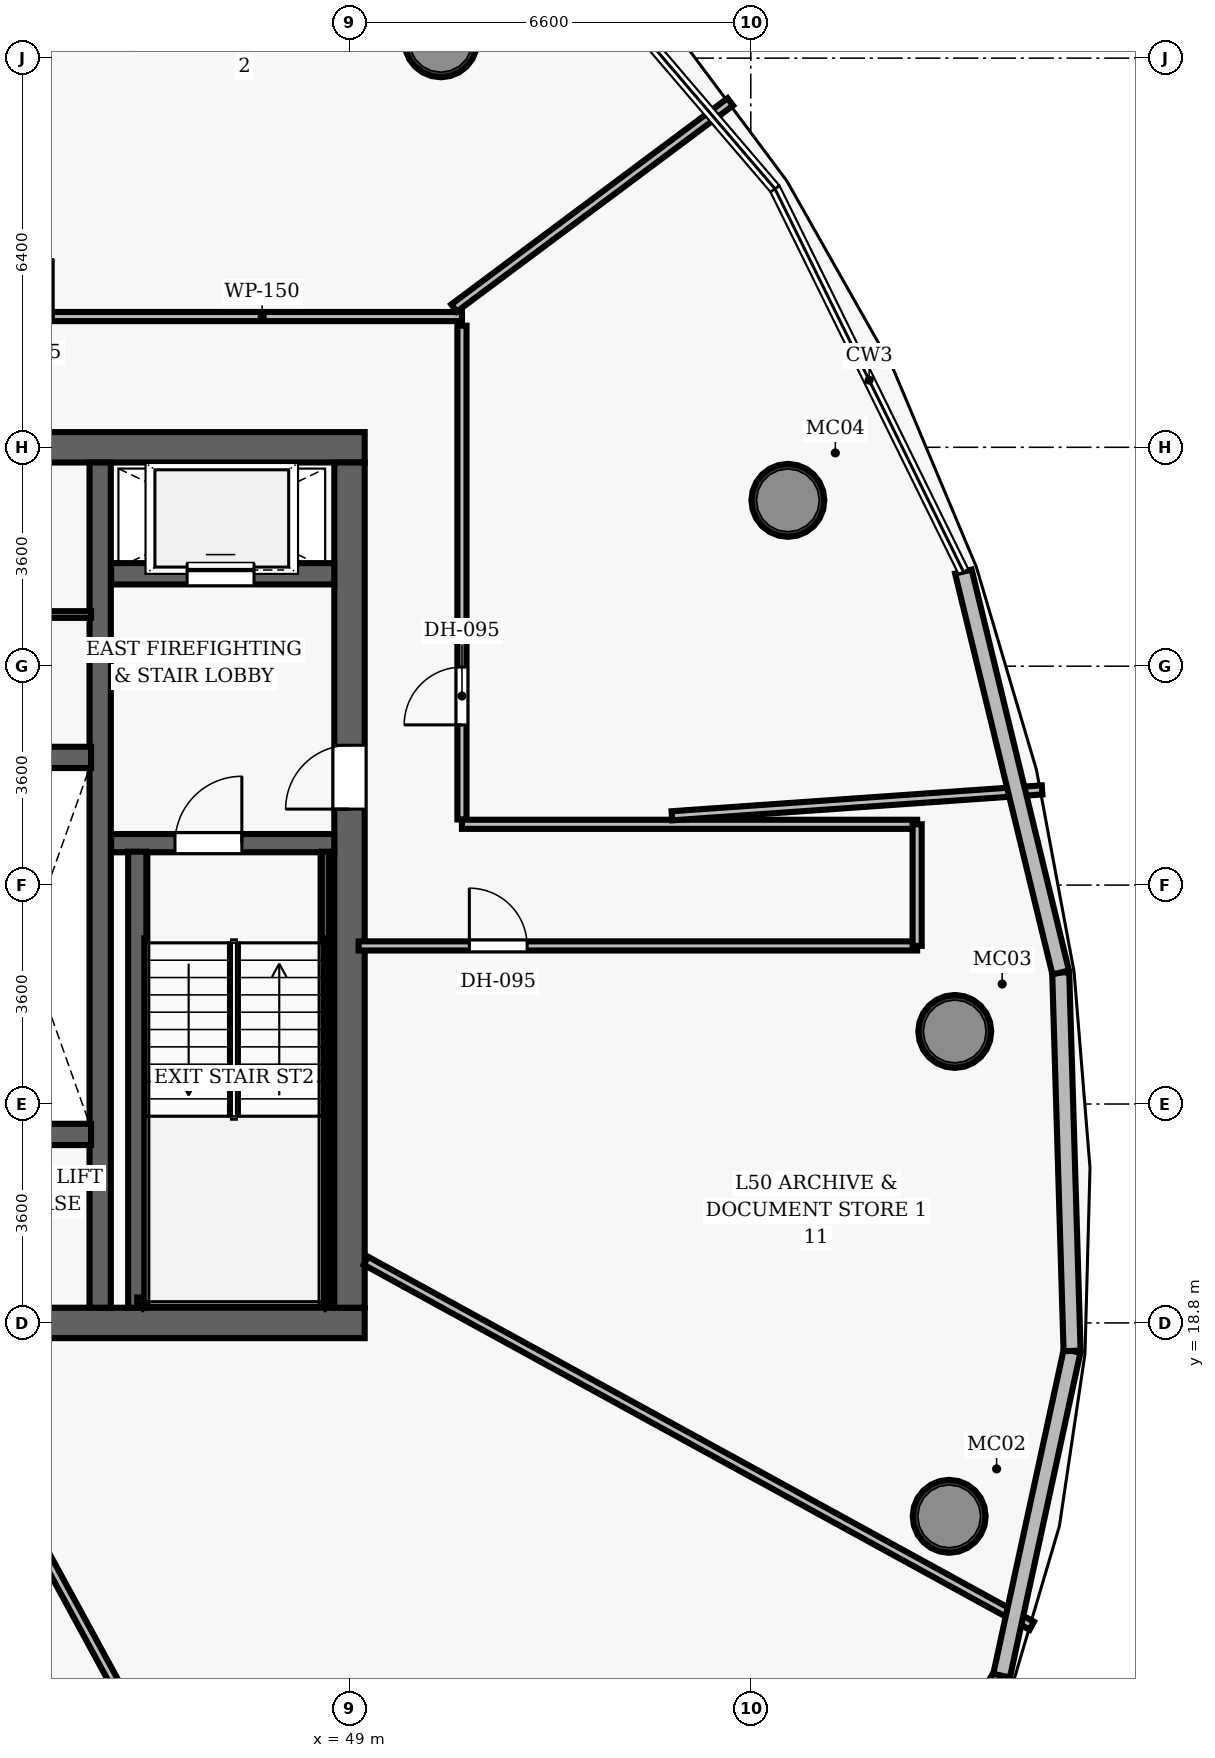
"""IFC4 building model, lengths in metres.
Left out: names, types, materials, properties, quantities, classifications, styles, units other than length and angle.
Written with IfcOpenShell. Run it as: python <this file> out.ifc"""

import sys

from ifc_helpers import new_model, si_unit, direction, frame, frame_2d, origin, origin_2d, place, context, subcontext, project, spatial, rectangle, hollow_circle, extrude, element, fill, save


model = new_model("IFC4")
c1 = context("Model", 3, precision=1e-05, world=origin(), true_north=direction((0.0, 1.0)))
c2 = subcontext(c1, "Body", "Model", "MODEL_VIEW")
j1 = project(units=[si_unit("LENGTHUNIT", "METRE"), si_unit("PLANEANGLEUNIT", "RADIAN")], contexts=[c1])
p1 = place(None, origin())
s1 = spatial("IfcSite", under=j1, at=p1, CompositionType="ELEMENT")
p2 = place(p1, origin())
s2 = spatial("IfcBuilding", under=s1, at=p2, CompositionType="ELEMENT")
p3 = place(p2, frame((0.0, 0.0, 198.15)))
s3 = spatial("IfcBuildingStorey", under=s2, at=p3, CompositionType="ELEMENT", Elevation=198.15)
p4 = place(p3, frame((26.75, 18.8, 0.0), z_axis=(0.0, 0.0, 1.0), x_axis=(1.0, 0.0, 0.0)))
e1 = element("IfcWall", 1, at=p4, inside=s3, PredefinedType="SHEAR", context=c2, shape_type="SweptSolid", body=[
    extrude(rectangle(XDim=22.5, YDim=0.5, at=frame_2d((11.25, 0.0))), origin(), (0.0, 0.0, 1.0), 3.85),
])
p5 = place(p4, frame((14.47, 0.0, 0.0)))
e2 = element("IfcOpeningElement", 2, at=p5, cuts=e1, PredefinedType="OPENING", context=c2, shape_type="SweptSolid", body=[
    extrude(rectangle(XDim=1.05, YDim=2.15, at=frame_2d((0.525, 1.075))), frame((0.0, 0.26, 0.0), z_axis=(0.0, -1.0, 0.0), x_axis=(1.0, 0.0, 0.0)), (0.0, 0.0, 1.0), 0.52),
])
p6 = place(p3, frame((26.75, 33.2, 0.0), z_axis=(0.0, 0.0, 1.0), x_axis=(1.0, 0.0, 0.0)))
e3 = element("IfcWall", 3, at=p6, inside=s3, PredefinedType="SHEAR", context=c2, shape_type="SweptSolid", body=[
    extrude(rectangle(XDim=22.5, YDim=0.5, at=frame_2d((11.25, 0.0))), origin(), (0.0, 0.0, 1.0), 3.85),
])
p7 = place(p6, frame((4.57, 0.0, 0.0)))
e4 = element("IfcOpeningElement", 4, at=p7, cuts=e3, PredefinedType="OPENING", context=c2, shape_type="SweptSolid", body=[
    extrude(rectangle(XDim=1.05, YDim=2.15, at=frame_2d((0.525, 1.075))), frame((0.0, 0.26, 0.0), z_axis=(0.0, -1.0, 0.0), x_axis=(1.0, 0.0, 0.0)), (0.0, 0.0, 1.0), 0.52),
])
p8 = place(p6, frame((14.47, 0.0, 0.0)))
e5 = element("IfcOpeningElement", 5, at=p8, cuts=e3, PredefinedType="OPENING", context=c2, shape_type="SweptSolid", body=[
    extrude(rectangle(XDim=1.05, YDim=2.15, at=frame_2d((0.525, 1.075))), frame((0.0, 0.26, 0.0), z_axis=(0.0, -1.0, 0.0), x_axis=(1.0, 0.0, 0.0)), (0.0, 0.0, 1.0), 0.52),
])
p9 = place(p3, frame((49.0, 19.05, 0.0), z_axis=(0.0, 0.0, 1.0), x_axis=(0.0, 1.0, 0.0)))
e6 = element("IfcWall", 6, at=p9, inside=s3, PredefinedType="SHEAR", context=c2, shape_type="SweptSolid", body=[
    extrude(rectangle(XDim=13.9, YDim=0.5, at=frame_2d((6.95, 0.0))), origin(), (0.0, 0.0, 1.0), 3.85),
])
p10 = place(p9, frame((8.2, 0.0, 0.0)))
e7 = element("IfcOpeningElement", 7, at=p10, cuts=e6, PredefinedType="OPENING", context=c2, shape_type="SweptSolid", body=[
    extrude(rectangle(XDim=1.05, YDim=2.15, at=frame_2d((0.525, 1.075))), frame((0.0, 0.26, 0.0), z_axis=(0.0, -1.0, 0.0), x_axis=(1.0, 0.0, 0.0)), (0.0, 0.0, 1.0), 0.52),
])
p11 = place(p3, frame((44.9, 19.05, 0.0), z_axis=(0.0, 0.0, 1.0), x_axis=(0.0, 1.0, 0.0)))
e8 = element("IfcWall", 8, at=p11, inside=s3, PredefinedType="SHEAR", context=c2, shape_type="SweptSolid", body=[
    extrude(rectangle(XDim=13.9, YDim=0.35, at=frame_2d((6.95, 0.0))), origin(), (0.0, 0.0, 1.0), 3.85),
])
for number, where, z_axis, x_axis in (
    (9, (58.863, 15.619, 0.0), (0.0, 0.0, 1.0), (1.0, 0.0, 0.0)),
    (10, (58.955, 23.594, 0.0), (0.0, 0.0, 1.0), (1.0, 0.0, 0.0)),
    (11, (56.21, 32.327, 0.0), (0.0, 0.0, 1.0), (1.0, 0.0, 0.0)),
    (12, (50.502, 39.885, 0.0), (0.0, 0.0, 1.0), (1.0, 0.0, 0.0)),
):
    element("IfcColumn", number, at=place(p3, frame(where, z_axis=z_axis, x_axis=x_axis)), inside=s3, PredefinedType="COLUMN", context=c2, shape_type="SweptSolid", body=[
        extrude(hollow_circle(Radius=0.6, WallThickness=0.05, at=origin_2d()), origin(), (0.0, 0.0, 1.0), 3.85),
    ])
p12 = place(p3, frame((45.08, 26.69, 0.0), z_axis=(0.0, 0.0, 1.0), x_axis=(1.0, 0.0, 0.0)))
e13 = element("IfcWall", 13, at=p12, inside=s3, PredefinedType="SHEAR", context=c2, shape_type="SweptSolid", body=[
    extrude(rectangle(XDim=3.67, YDim=0.3, at=frame_2d((1.835, 0.0))), origin(), (0.0, 0.0, 1.0), 3.85),
])
p13 = place(p12, frame((1.05, 0.0, 0.0)))
e14 = element("IfcOpeningElement", 14, at=p13, cuts=e13, PredefinedType="OPENING", context=c2, shape_type="SweptSolid", body=[
    extrude(rectangle(XDim=1.1, YDim=2.15, at=frame_2d((0.55, 1.075))), frame((0.0, 0.16, 0.0), z_axis=(0.0, -1.0, 0.0), x_axis=(1.0, 0.0, 0.0)), (0.0, 0.0, 1.0), 0.32),
])
p14 = place(p3, frame((45.51, 19.05, 0.0), z_axis=(0.0, 0.0, 1.0), x_axis=(0.0, 1.0, 0.0)))
e15 = element("IfcWall", 15, at=p14, inside=s3, PredefinedType="SHEAR", context=c2, shape_type="SweptSolid", body=[
    extrude(rectangle(XDim=7.5, YDim=0.3, at=frame_2d((3.75, 0.0))), origin(), (0.0, 0.0, 1.0), 3.85),
])
p15 = place(p3, frame((48.605, 19.1, 0.0), z_axis=(0.0, 0.0, 1.0), x_axis=(0.0, 1.0, 0.0)))
e16 = element("IfcWall", 16, at=p15, inside=s3, PredefinedType="SHEAR", context=c2, shape_type="SweptSolid", body=[
    extrude(rectangle(XDim=7.45, YDim=0.12, at=frame_2d((3.725, 0.0))), origin(), (0.0, 0.0, 1.0), 3.85),
])
p16 = place(p3, frame((45.51, 19.16, 0.0), z_axis=(0.0, 0.0, 1.0), x_axis=(1.0, 0.0, 0.0)))
e17 = element("IfcWall", 17, at=p16, inside=s3, PredefinedType="SHEAR", context=c2, shape_type="SweptSolid", body=[
    extrude(rectangle(XDim=3.095, YDim=0.12, at=frame_2d((1.547, 0.0))), origin(), (0.0, 0.0, 1.0), 3.85),
])
p17 = place(p3, frame((45.08, 31.12, 0.0), z_axis=(0.0, 0.0, 1.0), x_axis=(1.0, 0.0, 0.0)))
e18 = element("IfcWall", 18, at=p17, inside=s3, PredefinedType="SHEAR", context=c2, shape_type="SweptSolid", body=[
    extrude(rectangle(XDim=3.67, YDim=0.35, at=frame_2d((1.835, 0.0))), origin(), (0.0, 0.0, 1.0), 3.035),
])
p18 = place(p17, frame((1.25, 0.0, 0.0)))
e19 = element("IfcOpeningElement", 19, at=p18, cuts=e18, PredefinedType="OPENING", context=c2, shape_type="SweptSolid", body=[
    extrude(rectangle(XDim=1.1, YDim=2.15, at=frame_2d((0.55, 1.075))), frame((0.0, 0.185, 0.0), z_axis=(0.0, -1.0, 0.0), x_axis=(1.0, 0.0, 0.0)), (0.0, 0.0, 1.0), 0.37),
])
for number, where, z_axis, x_axis in (
    (20, (42.72, 21.9, 0.0), (0.0, 0.0, 1.0), (1.0, 0.0, 0.0)),
    (21, (42.72, 28.1, 0.0), (0.0, 0.0, 1.0), (1.0, 0.0, 0.0)),
):
    element("IfcWall", number, at=place(p3, frame(where, z_axis=z_axis, x_axis=x_axis)), inside=s3, PredefinedType="SHEAR", context=c2, shape_type="SweptSolid", body=[
        extrude(rectangle(XDim=2.03, YDim=0.35, at=frame_2d((1.015, 0.0))), origin(), (0.0, 0.0, 1.0), 3.035),
    ])
p19 = place(p3, frame((42.55, 30.45, 0.0), z_axis=(0.0, 0.0, 1.0), x_axis=(1.0, 0.0, 0.0)))
e22 = element("IfcWall", 22, at=p19, inside=s3, PredefinedType="PARTITIONING", context=c2, shape_type="SweptSolid", body=[
    extrude(rectangle(XDim=2.2, YDim=0.11, at=frame_2d((1.1, 0.0))), origin(), (0.0, 0.0, 1.0), 3.035),
])
p20 = place(p3, frame((24.85, 35.35, 0.0), z_axis=(0.0, 0.0, 1.0), x_axis=(1.0, 0.0, 0.0)))
e23 = element("IfcWall", 23, at=p20, inside=s3, PredefinedType="PARTITIONING", context=c2, shape_type="SweptSolid", body=[
    extrude(rectangle(XDim=26.0, YDim=0.15, at=frame_2d((13.0, 0.0))), origin(), (0.0, 0.0, 1.0), 3.035),
])
p21 = place(p20, frame((18.327, 0.0, 0.0)))
e24 = element("IfcOpeningElement", 24, at=p21, cuts=e23, PredefinedType="OPENING", context=c2, shape_type="SweptSolid", body=[
    extrude(rectangle(XDim=0.95, YDim=2.15, at=frame_2d((0.475, 1.075))), frame((0.0, 0.085, 0.0), z_axis=(0.0, -1.0, 0.0), x_axis=(1.0, 0.0, 0.0)), (0.0, 0.0, 1.0), 0.17),
])
p22 = place(p20, frame((11.881, 0.0, 0.0)))
e25 = element("IfcOpeningElement", 25, at=p22, cuts=e23, PredefinedType="OPENING", context=c2, shape_type="SweptSolid", body=[
    extrude(rectangle(XDim=0.95, YDim=2.15, at=frame_2d((0.475, 1.075))), frame((0.0, 0.085, 0.0), z_axis=(0.0, -1.0, 0.0), x_axis=(1.0, 0.0, 0.0)), (0.0, 0.0, 1.0), 0.17),
])
p23 = place(p20, frame((5.711, 0.0, 0.0)))
e26 = element("IfcOpeningElement", 26, at=p23, cuts=e23, PredefinedType="OPENING", context=c2, shape_type="SweptSolid", body=[
    extrude(rectangle(XDim=0.95, YDim=2.15, at=frame_2d((0.475, 1.075))), frame((0.0, 0.085, 0.0), z_axis=(0.0, -1.0, 0.0), x_axis=(1.0, 0.0, 0.0)), (0.0, 0.0, 1.0), 0.17),
])
p24 = place(p20, frame((1.528, 0.0, 0.0)))
e27 = element("IfcOpeningElement", 27, at=p24, cuts=e23, PredefinedType="OPENING", context=c2, shape_type="SweptSolid", body=[
    extrude(rectangle(XDim=0.95, YDim=2.15, at=frame_2d((0.475, 1.075))), frame((0.0, 0.085, 0.0), z_axis=(0.0, -1.0, 0.0), x_axis=(1.0, 0.0, 0.0)), (0.0, 0.0, 1.0), 0.17),
])
p25 = place(p3, frame((50.85, 27.08, 0.0), z_axis=(0.0, 0.0, 1.0), x_axis=(0.0, 1.0, 0.0)))
e28 = element("IfcWall", 28, at=p25, inside=s3, PredefinedType="PARTITIONING", context=c2, shape_type="SweptSolid", body=[
    extrude(rectangle(XDim=8.12, YDim=0.15, at=frame_2d((4.06, 0.0))), origin(), (0.0, 0.0, 1.0), 3.035),
])
p26 = place(p25, frame((1.555, 0.0, 0.0)))
e29 = element("IfcOpeningElement", 29, at=p26, cuts=e28, PredefinedType="OPENING", context=c2, shape_type="SweptSolid", body=[
    extrude(rectangle(XDim=0.95, YDim=2.15, at=frame_2d((0.475, 1.075))), frame((0.0, 0.085, 0.0), z_axis=(0.0, -1.0, 0.0), x_axis=(1.0, 0.0, 0.0)), (0.0, 0.0, 1.0), 0.17),
])
p27 = place(p3, frame((50.85, 27.0, 0.0), z_axis=(0.0, 0.0, 1.0), x_axis=(1.0, 0.0, 0.0)))
e30 = element("IfcWall", 30, at=p27, inside=s3, PredefinedType="PARTITIONING", context=c2, shape_type="SweptSolid", body=[
    extrude(rectangle(XDim=7.486, YDim=0.15, at=frame_2d((3.743, 0.0))), origin(), (0.0, 0.0, 1.0), 3.035),
])
p28 = place(p3, frame((49.15, 25.0, 0.0), z_axis=(0.0, 0.0, 1.0), x_axis=(1.0, 0.0, 0.0)))
e31 = element("IfcWall", 31, at=p28, inside=s3, PredefinedType="PARTITIONING", context=c2, shape_type="SweptSolid", body=[
    extrude(rectangle(XDim=9.186, YDim=0.15, at=frame_2d((4.593, 0.0))), origin(), (0.0, 0.0, 1.0), 3.035),
])
p29 = place(p28, frame((1.822, 0.0, 0.0)))
e32 = element("IfcOpeningElement", 32, at=p29, cuts=e31, PredefinedType="OPENING", context=c2, shape_type="SweptSolid", body=[
    extrude(rectangle(XDim=0.95, YDim=2.15, at=frame_2d((0.475, 1.075))), frame((0.0, 0.085, 0.0), z_axis=(0.0, -1.0, 0.0), x_axis=(1.0, 0.0, 0.0)), (0.0, 0.0, 1.0), 0.17),
])
p30 = place(p3, frame((58.336, 25.0, 0.0), z_axis=(0.0, 0.0, 1.0), x_axis=(0.0, 1.0, 0.0)))
e33 = element("IfcWall", 33, at=p30, inside=s3, PredefinedType="PARTITIONING", context=c2, shape_type="SweptSolid", body=[
    extrude(rectangle(XDim=2.0, YDim=0.15, at=frame_2d((1.0, 0.0))), origin(), (0.0, 0.0, 1.0), 3.035),
])
p31 = place(p3, frame((54.303, 27.14, 0.0), z_axis=(0.0, 0.0, 1.0), x_axis=(0.997563201077, 0.069768616566, 0.0)))
e34 = element("IfcWall", 34, at=p31, inside=s3, PredefinedType="PARTITIONING", context=c2, shape_type="SweptSolid", body=[
    extrude(rectangle(XDim=6.103, YDim=0.15, at=frame_2d((3.051, 0.0))), origin(), (0.0, 0.0, 1.0), 3.035),
])
p32 = place(p3, frame((50.719, 35.49, 0.0), z_axis=(0.0, 0.0, 1.0), x_axis=(0.801485791148, 0.598013818057, 0.0)))
e35 = element("IfcWall", 35, at=p32, inside=s3, PredefinedType="PARTITIONING", context=c2, shape_type="SweptSolid", body=[
    extrude(rectangle(XDim=5.669, YDim=0.15, at=frame_2d((2.835, 0.0))), origin(), (0.0, 0.0, 1.0), 3.035),
])
p33 = place(p3, frame((41.557, 35.49, 0.0), z_axis=(0.0, 0.0, 1.0), x_axis=(0.350952470756, 0.936393273828, 0.0)))
e36 = element("IfcWall", 36, at=p33, inside=s3, PredefinedType="PARTITIONING", context=c2, shape_type="SweptSolid", body=[
    extrude(rectangle(XDim=12.207, YDim=0.15, at=frame_2d((6.103, 0.0))), origin(), (0.0, 0.0, 1.0), 3.035),
])
p34 = place(p3, frame((42.74, 17.287, 0.0), z_axis=(0.0, 0.0, 1.0), x_axis=(0.477858429319, -0.878436862574, 0.0)))
e37 = element("IfcWall", 37, at=p34, inside=s3, PredefinedType="PARTITIONING", context=c2, shape_type="SweptSolid", body=[
    extrude(rectangle(XDim=14.791, YDim=0.15, at=frame_2d((7.396, 0.0))), origin(), (0.0, 0.0, 1.0), 3.035),
])
p35 = place(p3, frame((49.27, 19.823, 0.0), z_axis=(0.0, 0.0, 1.0), x_axis=(0.876912085574, -0.48065080274, 0.0)))
e38 = element("IfcWall", 38, at=p35, inside=s3, PredefinedType="PARTITIONING", context=c2, shape_type="SweptSolid", body=[
    extrude(rectangle(XDim=12.489, YDim=0.15, at=frame_2d((6.245, 0.0))), origin(), (0.0, 0.0, 1.0), 3.035),
])
p36 = place(p3, frame((59.725, 13.0, 0.0), z_axis=(0.0, 0.0, 1.0), x_axis=(-0.514046546847, -0.857762290891, 0.0)))
e39 = element("IfcWall", 39, at=p36, inside=s3, PredefinedType="SOLIDWALL", context=c2, shape_type="SweptSolid", body=[
    extrude(rectangle(XDim=4.876, YDim=0.28, at=frame_2d((2.438, 0.0))), origin(), (0.0, 0.0, 1.0), 3.62),
])
p37 = place(p3, frame((60.884, 18.34, 0.0), z_axis=(0.0, 0.0, 1.0), x_axis=(-0.21208833361, -0.977250499486, 0.0)))
e40 = element("IfcWall", 40, at=p37, inside=s3, PredefinedType="SOLIDWALL", context=c2, shape_type="SweptSolid", body=[
    extrude(rectangle(XDim=5.464, YDim=0.28, at=frame_2d((2.732, 0.0))), origin(), (0.0, 0.0, 1.0), 3.62),
])
p38 = place(p3, frame((60.697, 24.563, 0.0), z_axis=(0.0, 0.0, 1.0), x_axis=(0.030035086117, -0.999548845031, 0.0)))
e41 = element("IfcWall", 41, at=p38, inside=s3, PredefinedType="SOLIDWALL", context=c2, shape_type="SweptSolid", body=[
    extrude(rectangle(XDim=6.227, YDim=0.28, at=frame_2d((3.113, 0.0))), origin(), (0.0, 0.0, 1.0), 3.62),
])
p39 = place(p3, frame((59.096, 31.156, 0.0), z_axis=(0.0, 0.0, 1.0), x_axis=(0.235951211477, -0.971764902537, 0.0)))
e42 = element("IfcWall", 42, at=p39, inside=s3, PredefinedType="SOLIDWALL", context=c2, shape_type="SweptSolid", body=[
    extrude(rectangle(XDim=6.785, YDim=0.28, at=frame_2d((3.392, 0.0))), origin(), (0.0, 0.0, 1.0), 3.62),
])
p40 = place(p13, origin())
e43 = element("IfcDoor", 43, at=p40, inside=s3, OperationType="SINGLE_SWING_RIGHT", PredefinedType="DOOR", context=c2, shape_type="SweptSolid", body=[
    extrude(rectangle(XDim=1.1, YDim=2.15, at=frame_2d((0.55, 1.075))), frame((0.0, 0.025, 0.0), z_axis=(0.0, -1.0, 0.0), x_axis=(1.0, 0.0, 0.0)), (0.0, 0.0, 1.0), 0.05),
])
fill(e14, e43)
p41 = place(p10, origin())
e44 = element("IfcDoor", 44, at=p41, inside=s3, OperationType="SINGLE_SWING_LEFT", PredefinedType="DOOR", context=c2, shape_type="SweptSolid", body=[
    extrude(rectangle(XDim=1.05, YDim=2.15, at=frame_2d((0.525, 1.075))), frame((0.0, 0.025, 0.0), z_axis=(0.0, -1.0, 0.0), x_axis=(1.0, 0.0, 0.0)), (0.0, 0.0, 1.0), 0.05),
])
fill(e7, e44)
p42 = place(p26, origin())
e45 = element("IfcDoor", 45, at=p42, inside=s3, OperationType="SINGLE_SWING_LEFT", PredefinedType="DOOR", context=c2, shape_type="SweptSolid", body=[
    extrude(rectangle(XDim=0.95, YDim=2.15, at=frame_2d((0.475, 1.075))), frame((0.0, 0.025, 0.0), z_axis=(0.0, -1.0, 0.0), x_axis=(1.0, 0.0, 0.0)), (0.0, 0.0, 1.0), 0.05),
])
fill(e29, e45)
p43 = place(p21, origin())
e46 = element("IfcDoor", 46, at=p43, inside=s3, OperationType="SINGLE_SWING_RIGHT", PredefinedType="DOOR", context=c2, shape_type="SweptSolid", body=[
    extrude(rectangle(XDim=0.95, YDim=2.15, at=frame_2d((0.475, 1.075))), frame((0.0, 0.025, 0.0), z_axis=(0.0, -1.0, 0.0), x_axis=(1.0, 0.0, 0.0)), (0.0, 0.0, 1.0), 0.05),
])
fill(e24, e46)
p44 = place(p29, origin())
e47 = element("IfcDoor", 47, at=p44, inside=s3, OperationType="SINGLE_SWING_LEFT", PredefinedType="DOOR", context=c2, shape_type="SweptSolid", body=[
    extrude(rectangle(XDim=0.95, YDim=2.15, at=frame_2d((0.475, 1.075))), frame((0.0, 0.025, 0.0), z_axis=(0.0, -1.0, 0.0), x_axis=(1.0, 0.0, 0.0)), (0.0, 0.0, 1.0), 0.05),
])
fill(e32, e47)
p45 = place(p18, origin())
e48 = element("IfcDoor", 48, at=p45, inside=s3, OperationType="SLIDING_TO_LEFT", PredefinedType="DOOR", context=c2, shape_type="SweptSolid", body=[
    extrude(rectangle(XDim=1.1, YDim=2.15, at=frame_2d((0.55, 1.075))), frame((0.0, 0.025, 0.0), z_axis=(0.0, -1.0, 0.0), x_axis=(1.0, 0.0, 0.0)), (0.0, 0.0, 1.0), 0.05),
])
fill(e19, e48)
save(model, sys.argv[1])
